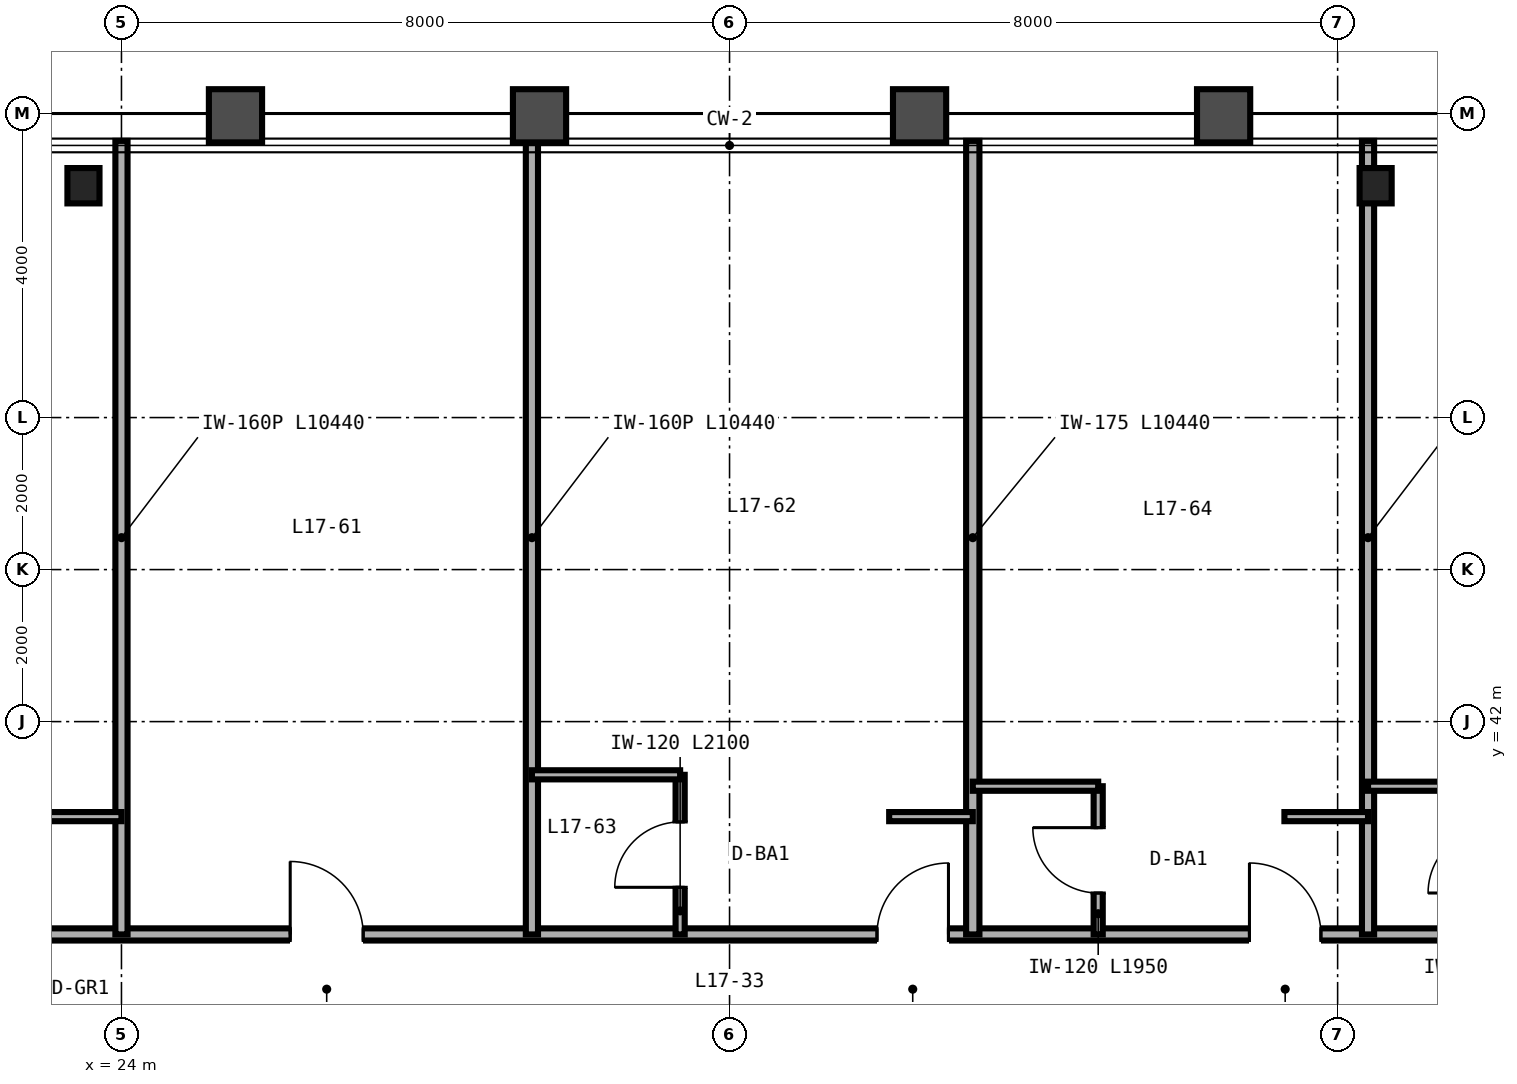
"""IFC4 building model, lengths in metres.
Left out: names, types, materials, properties, quantities, classifications, styles, units other than length and angle.
Written with IfcOpenShell. Run it as: python <this file> out.ifc"""

import sys

from ifc_helpers import new_model, si_unit, direction, frame, frame_2d, origin, origin_2d, place, context, subcontext, project, spatial, rectangle, i_section, extrude, source, transform, mapped, element, fill, save


model = new_model("IFC4")
c1 = context("Model", 3, precision=1e-05, world=origin(), true_north=direction((0.0, 1.0)))
c2 = subcontext(c1, "Body", "Model", "MODEL_VIEW")
j1 = project(units=[si_unit("LENGTHUNIT", "METRE"), si_unit("PLANEANGLEUNIT", "RADIAN")], contexts=[c1])
p1 = place(None, origin())
s1 = spatial("IfcSite", under=j1, at=p1, CompositionType="ELEMENT")
p2 = place(p1, origin())
s2 = spatial("IfcBuilding", under=s1, at=p2, CompositionType="ELEMENT")
p3 = place(p2, frame((0.0, 0.0, 70.8)))
s3 = spatial("IfcBuildingStorey", under=s2, at=p3, CompositionType="ELEMENT", Elevation=70.8)
m1 = source(origin(), c2, "Body", "SweptSolid", [
    extrude(i_section(OverallWidth=0.422, OverallDepth=0.465, WebThickness=0.045, FlangeThickness=0.073, FilletRadius=0.025, at=origin_2d()), origin(), (0.0, 0.0, 1.0), 3.35),
])
for number, where, z_axis, x_axis in (
    (1, (23.5, 49.05, 0.0), (0.0, 0.0, 1.0), (1.0, 0.0, 0.0)),
    (2, (40.5, 49.05, 0.0), (0.0, 0.0, 1.0), (1.0, 0.0, 0.0)),
):
    element("IfcColumn", number, at=place(p3, frame(where, z_axis=z_axis, x_axis=x_axis)), inside=s3, PredefinedType="COLUMN", context=c2, shape_type="MappedRepresentation", body=[
        mapped(m1, transform((0.0, 0.0, 0.0), scale=1.0)),
    ])
p4 = place(p3, frame((14.0, 39.2, 0.0), z_axis=(0.0, 0.0, 1.0), x_axis=(1.0, 0.0, 0.0)))
e3 = element("IfcWall", 3, at=p4, inside=s3, PredefinedType="PARTITIONING", context=c2, shape_type="SweptSolid", body=[
    extrude(rectangle(XDim=36.0, YDim=0.16, at=frame_2d((18.0, 0.0))), origin(), (0.0, 0.0, 1.0), 2.571),
])
p5 = place(p4, frame((3.74, 0.0, 0.0)))
e4 = element("IfcOpeningElement", 4, at=p5, cuts=e3, PredefinedType="OPENING", context=c2, shape_type="SweptSolid", body=[
    extrude(rectangle(XDim=0.94, YDim=2.15, at=frame_2d((0.47, 1.075))), frame((0.0, 0.09, 0.0), z_axis=(0.0, -1.0, 0.0), x_axis=(1.0, 0.0, 0.0)), (0.0, 0.0, 1.0), 0.18),
])
p6 = place(p4, frame((7.79, 0.0, 0.0)))
e5 = element("IfcOpeningElement", 5, at=p6, cuts=e3, PredefinedType="OPENING", context=c2, shape_type="SweptSolid", body=[
    extrude(rectangle(XDim=0.94, YDim=2.15, at=frame_2d((0.47, 1.075))), frame((0.0, 0.09, 0.0), z_axis=(0.0, -1.0, 0.0), x_axis=(1.0, 0.0, 0.0)), (0.0, 0.0, 1.0), 0.18),
])
p7 = place(p4, frame((12.22, 0.0, 0.0)))
e6 = element("IfcOpeningElement", 6, at=p7, cuts=e3, PredefinedType="OPENING", context=c2, shape_type="SweptSolid", body=[
    extrude(rectangle(XDim=0.96, YDim=2.15, at=frame_2d((0.48, 1.075))), frame((0.0, 0.09, 0.0), z_axis=(0.0, -1.0, 0.0), x_axis=(1.0, 0.0, 0.0)), (0.0, 0.0, 1.0), 0.18),
])
p8 = place(p4, frame((19.94, 0.0, 0.0)))
e7 = element("IfcOpeningElement", 7, at=p8, cuts=e3, PredefinedType="OPENING", context=c2, shape_type="SweptSolid", body=[
    extrude(rectangle(XDim=0.94, YDim=2.15, at=frame_2d((0.47, 1.075))), frame((0.0, 0.09, 0.0), z_axis=(0.0, -1.0, 0.0), x_axis=(1.0, 0.0, 0.0)), (0.0, 0.0, 1.0), 0.18),
])
p9 = place(p4, frame((24.84, 0.0, 0.0)))
e8 = element("IfcOpeningElement", 8, at=p9, cuts=e3, PredefinedType="OPENING", context=c2, shape_type="SweptSolid", body=[
    extrude(rectangle(XDim=0.94, YDim=2.15, at=frame_2d((0.47, 1.075))), frame((0.0, 0.09, 0.0), z_axis=(0.0, -1.0, 0.0), x_axis=(1.0, 0.0, 0.0)), (0.0, 0.0, 1.0), 0.18),
])
p10 = place(p4, frame((29.94, 0.0, 0.0)))
e9 = element("IfcOpeningElement", 9, at=p10, cuts=e3, PredefinedType="OPENING", context=c2, shape_type="SweptSolid", body=[
    extrude(rectangle(XDim=0.94, YDim=2.15, at=frame_2d((0.47, 1.075))), frame((0.0, 0.09, 0.0), z_axis=(0.0, -1.0, 0.0), x_axis=(1.0, 0.0, 0.0)), (0.0, 0.0, 1.0), 0.18),
])
p11 = place(p4, frame((33.12, 0.0, 0.0)))
e10 = element("IfcOpeningElement", 10, at=p11, cuts=e3, PredefinedType="OPENING", context=c2, shape_type="SweptSolid", body=[
    extrude(rectangle(XDim=0.96, YDim=2.15, at=frame_2d((0.48, 1.075))), frame((0.0, 0.09, 0.0), z_axis=(0.0, -1.0, 0.0), x_axis=(1.0, 0.0, 0.0)), (0.0, 0.0, 1.0), 0.18),
])
p12 = place(p3, frame((24.0, 39.2, 0.0), z_axis=(0.0, 0.0, 1.0), x_axis=(0.0, 1.0, 0.0)))
e11 = element("IfcWall", 11, at=p12, inside=s3, PredefinedType="PARTITIONING", context=c2, shape_type="SweptSolid", body=[
    extrude(rectangle(XDim=10.44, YDim=0.16, at=frame_2d((5.22, 0.0))), origin(), (0.0, 0.0, 1.0), 2.423),
])
p13 = place(p3, frame((22.9, 40.75, 0.0), z_axis=(0.0, 0.0, 1.0), x_axis=(1.0, 0.0, 0.0)))
e12 = element("IfcWall", 12, at=p13, inside=s3, PredefinedType="PARTITIONING", context=c2, shape_type="SweptSolid", body=[
    extrude(rectangle(XDim=1.1, YDim=0.12, at=frame_2d((0.55, 0.0))), origin(), (0.0, 0.0, 1.0), 2.571),
])
p14 = place(p3, frame((29.4, 39.2, 0.0), z_axis=(0.0, 0.0, 1.0), x_axis=(0.0, 1.0, 0.0)))
e13 = element("IfcWall", 13, at=p14, inside=s3, PredefinedType="PARTITIONING", context=c2, shape_type="SweptSolid", body=[
    extrude(rectangle(XDim=10.44, YDim=0.16, at=frame_2d((5.22, 0.0))), origin(), (0.0, 0.0, 1.0), 2.423),
])
p15 = place(p3, frame((35.2, 39.2, 0.0), z_axis=(0.0, 0.0, 1.0), x_axis=(0.0, 1.0, 0.0)))
e14 = element("IfcWall", 14, at=p15, inside=s3, PredefinedType="PARTITIONING", context=c2, shape_type="SweptSolid", body=[
    extrude(rectangle(XDim=10.44, YDim=0.175, at=frame_2d((5.22, 0.0))), origin(), (0.0, 0.0, 1.0), 2.423),
])
p16 = place(p3, frame((31.35, 39.2, 0.0), z_axis=(0.0, 0.0, 1.0), x_axis=(0.0, 1.0, 0.0)))
e15 = element("IfcWall", 15, at=p16, inside=s3, PredefinedType="PARTITIONING", context=c2, shape_type="SweptSolid", body=[
    extrude(rectangle(XDim=2.1, YDim=0.12, at=frame_2d((1.05, 0.0))), origin(), (0.0, 0.0, 1.0), 3.35),
])
p17 = place(p16, frame((0.62, 0.0, 0.0)))
e16 = element("IfcOpeningElement", 16, at=p17, cuts=e15, PredefinedType="OPENING", context=c2, shape_type="SweptSolid", body=[
    extrude(rectangle(XDim=0.86, YDim=2.1, at=frame_2d((0.43, 1.05))), frame((0.0, 0.07, 0.0), z_axis=(0.0, -1.0, 0.0), x_axis=(1.0, 0.0, 0.0)), (0.0, 0.0, 1.0), 0.14),
])
p18 = place(p3, frame((29.4, 41.3, 0.0), z_axis=(0.0, 0.0, 1.0), x_axis=(1.0, 0.0, 0.0)))
e17 = element("IfcWall", 17, at=p18, inside=s3, PredefinedType="PARTITIONING", context=c2, shape_type="SweptSolid", body=[
    extrude(rectangle(XDim=1.95, YDim=0.12, at=frame_2d((0.975, 0.0))), origin(), (0.0, 0.0, 1.0), 3.35),
])
p19 = place(p3, frame((34.1, 40.75, 0.0), z_axis=(0.0, 0.0, 1.0), x_axis=(1.0, 0.0, 0.0)))
e18 = element("IfcWall", 18, at=p19, inside=s3, PredefinedType="PARTITIONING", context=c2, shape_type="SweptSolid", body=[
    extrude(rectangle(XDim=1.1, YDim=0.12, at=frame_2d((0.55, 0.0))), origin(), (0.0, 0.0, 1.0), 3.35),
])
p20 = place(p3, frame((40.4, 39.2, 0.0), z_axis=(0.0, 0.0, 1.0), x_axis=(0.0, 1.0, 0.0)))
e19 = element("IfcWall", 19, at=p20, inside=s3, PredefinedType="PARTITIONING", context=c2, shape_type="SweptSolid", body=[
    extrude(rectangle(XDim=10.44, YDim=0.16, at=frame_2d((5.22, 0.0))), origin(), (0.0, 0.0, 1.0), 2.423),
])
p21 = place(p3, frame((36.85, 39.2, 0.0), z_axis=(0.0, 0.0, 1.0), x_axis=(0.0, 1.0, 0.0)))
e20 = element("IfcWall", 20, at=p21, inside=s3, PredefinedType="PARTITIONING", context=c2, shape_type="SweptSolid", body=[
    extrude(rectangle(XDim=1.95, YDim=0.12, at=frame_2d((0.975, 0.0))), origin(), (0.0, 0.0, 1.0), 3.35),
])
p22 = place(p21, frame((0.545, 0.0, 0.0)))
e21 = element("IfcOpeningElement", 21, at=p22, cuts=e20, PredefinedType="OPENING", context=c2, shape_type="SweptSolid", body=[
    extrude(rectangle(XDim=0.86, YDim=2.1, at=frame_2d((0.43, 1.05))), frame((0.0, 0.07, 0.0), z_axis=(0.0, -1.0, 0.0), x_axis=(1.0, 0.0, 0.0)), (0.0, 0.0, 1.0), 0.14),
])
p23 = place(p3, frame((35.2, 41.15, 0.0), z_axis=(0.0, 0.0, 1.0), x_axis=(1.0, 0.0, 0.0)))
e22 = element("IfcWall", 22, at=p23, inside=s3, PredefinedType="PARTITIONING", context=c2, shape_type="SweptSolid", body=[
    extrude(rectangle(XDim=1.65, YDim=0.12, at=frame_2d((0.825, 0.0))), origin(), (0.0, 0.0, 1.0), 3.35),
])
p24 = place(p3, frame((39.3, 40.75, 0.0), z_axis=(0.0, 0.0, 1.0), x_axis=(1.0, 0.0, 0.0)))
e23 = element("IfcWall", 23, at=p24, inside=s3, PredefinedType="PARTITIONING", context=c2, shape_type="SweptSolid", body=[
    extrude(rectangle(XDim=1.1, YDim=0.12, at=frame_2d((0.55, 0.0))), origin(), (0.0, 0.0, 1.0), 2.571),
])
p25 = place(p3, frame((40.4, 41.15, 0.0), z_axis=(0.0, 0.0, 1.0), x_axis=(1.0, 0.0, 0.0)))
e24 = element("IfcWall", 24, at=p25, inside=s3, PredefinedType="PARTITIONING", context=c2, shape_type="SweptSolid", body=[
    extrude(rectangle(XDim=1.65, YDim=0.12, at=frame_2d((0.825, 0.0))), origin(), (0.0, 0.0, 1.0), 2.571),
])
m2 = source(origin(), c2, "Body", "SweptSolid", [
    extrude(rectangle(XDim=0.86, YDim=2.1, at=frame_2d((0.43, 1.05))), frame((0.0, 0.025, 0.0), z_axis=(0.0, -1.0, 0.0), x_axis=(1.0, 0.0, 0.0)), (0.0, 0.0, 1.0), 0.05),
])
p26 = place(p17, origin())
e25 = element("IfcDoor", 25, at=p26, inside=s3, OperationType="SINGLE_SWING_LEFT", PredefinedType="DOOR", context=c2, shape_type="MappedRepresentation", body=[
    mapped(m2, transform((0.0, 0.0, 0.0), scale=1.0)),
])
fill(e16, e25)
p27 = place(p22, origin())
e26 = element("IfcDoor", 26, at=p27, inside=s3, OperationType="SINGLE_SWING_RIGHT", PredefinedType="DOOR", context=c2, shape_type="MappedRepresentation", body=[
    mapped(m2, transform((0.0, 0.0, 0.0), scale=1.0)),
])
fill(e21, e26)
m3 = source(origin(), c2, "Body", "SweptSolid", [
    extrude(rectangle(XDim=0.96, YDim=2.15, at=frame_2d((0.48, 1.075))), frame((0.0, 0.025, 0.0), z_axis=(0.0, -1.0, 0.0), x_axis=(1.0, 0.0, 0.0)), (0.0, 0.0, 1.0), 0.05),
])
p28 = place(p7, origin())
e27 = element("IfcDoor", 27, at=p28, inside=s3, OperationType="SINGLE_SWING_LEFT", PredefinedType="DOOR", context=c2, shape_type="MappedRepresentation", body=[
    mapped(m3, transform((0.0, 0.0, 0.0), scale=1.0)),
])
fill(e6, e27)
m4 = source(origin(), c2, "Body", "SweptSolid", [
    extrude(rectangle(XDim=0.94, YDim=2.15, at=frame_2d((0.47, 1.075))), frame((0.0, 0.025, 0.0), z_axis=(0.0, -1.0, 0.0), x_axis=(1.0, 0.0, 0.0)), (0.0, 0.0, 1.0), 0.05),
])
p29 = place(p8, origin())
e28 = element("IfcDoor", 28, at=p29, inside=s3, OperationType="SINGLE_SWING_RIGHT", PredefinedType="DOOR", context=c2, shape_type="MappedRepresentation", body=[
    mapped(m4, transform((0.0, 0.0, 0.0), scale=1.0)),
])
fill(e7, e28)
p30 = place(p9, origin())
e29 = element("IfcDoor", 29, at=p30, inside=s3, OperationType="SINGLE_SWING_LEFT", PredefinedType="DOOR", context=c2, shape_type="MappedRepresentation", body=[
    mapped(m4, transform((0.0, 0.0, 0.0), scale=1.0)),
])
fill(e8, e29)
save(model, sys.argv[1])
